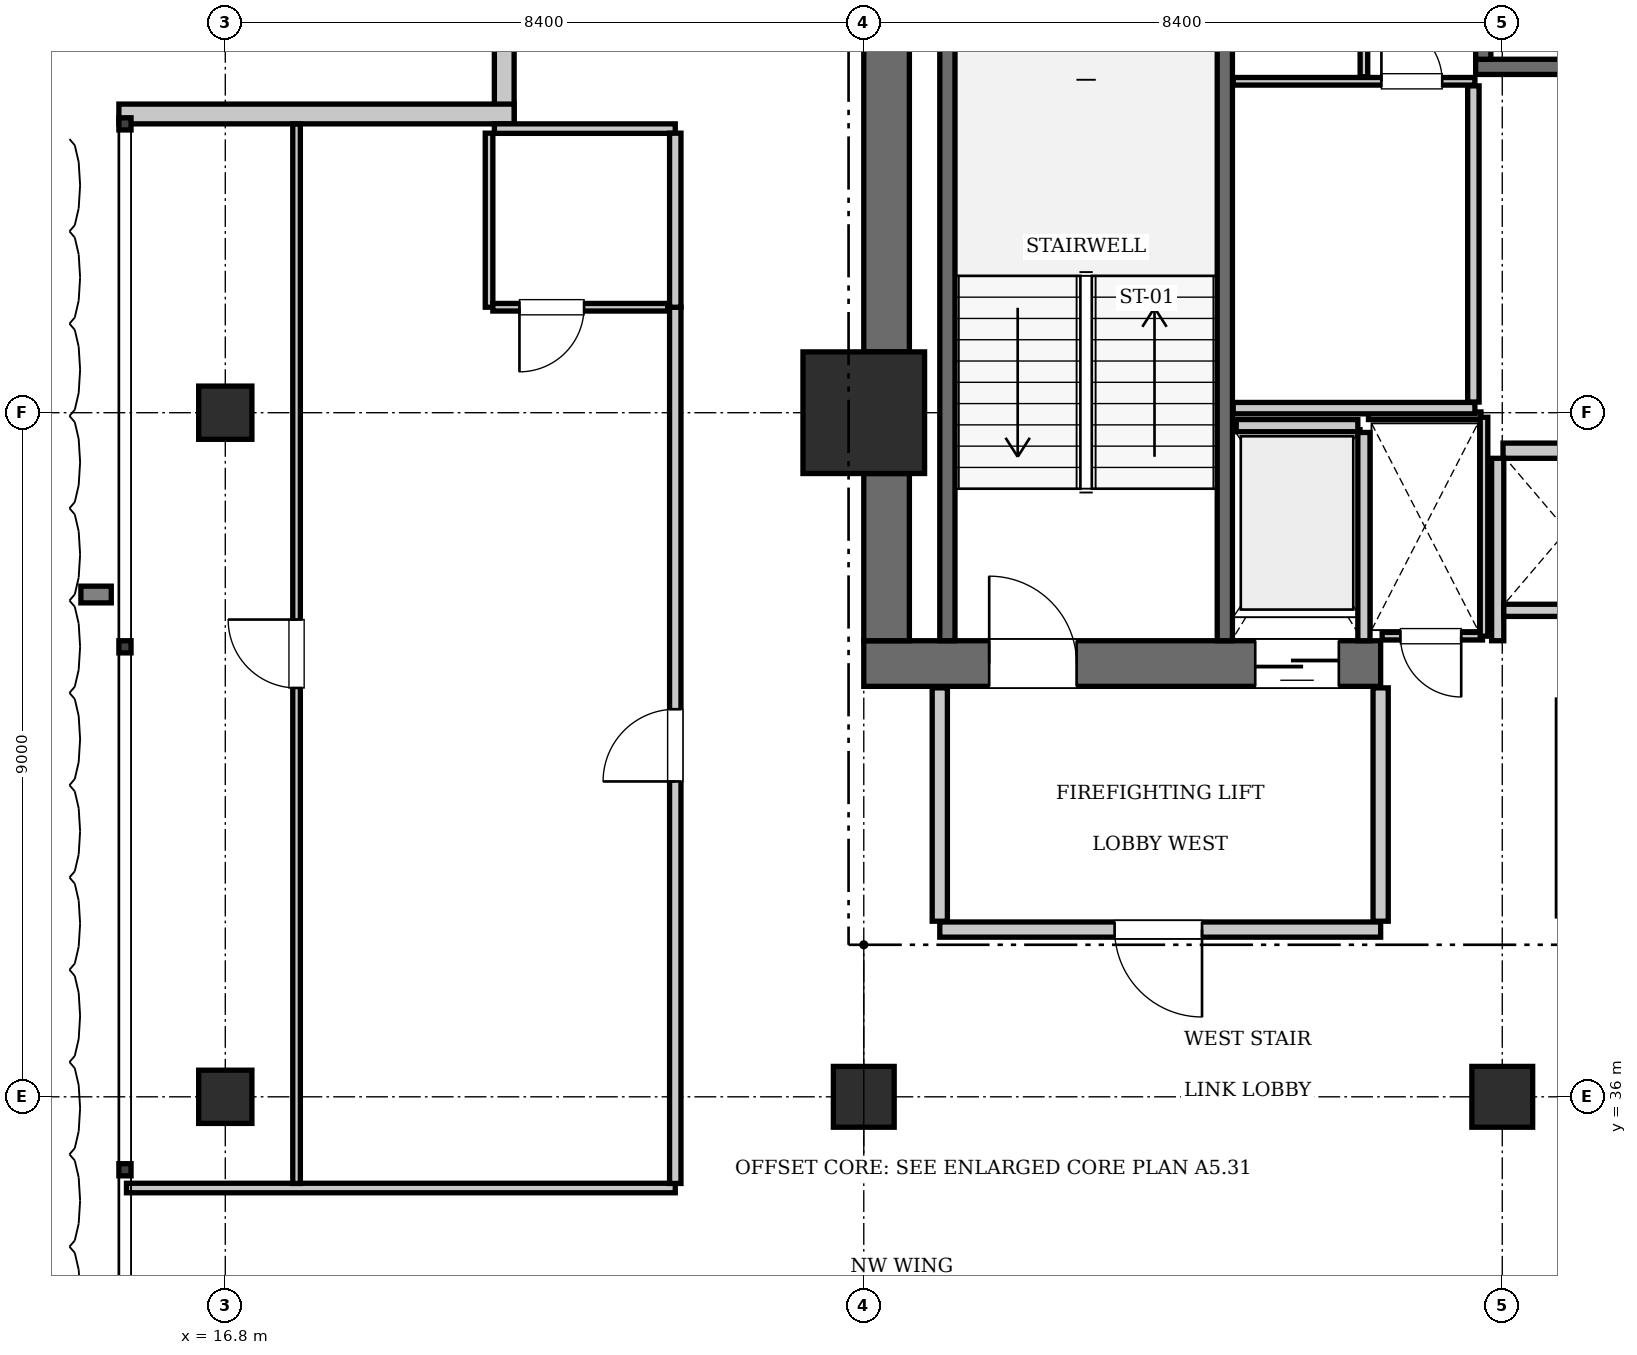
"""IFC4 building model, lengths in metres.
Left out: names, types, materials, properties, quantities, classifications, styles, units other than length and angle.
Written with IfcOpenShell. Run it as: python <this file> out.ifc"""

import sys

from ifc_helpers import new_model, si_unit, direction, frame, frame_2d, origin, origin_2d, place, context, subcontext, project, spatial, rectangle, extrude, element, fill, save


model = new_model("IFC4")
c1 = context("Model", 3, precision=1e-05, world=origin(), true_north=direction((0.0, 1.0)))
c2 = subcontext(c1, "Body", "Model", "MODEL_VIEW")
j1 = project(units=[si_unit("LENGTHUNIT", "METRE"), si_unit("PLANEANGLEUNIT", "RADIAN")], contexts=[c1])
p1 = place(None, origin())
s1 = spatial("IfcSite", under=j1, at=p1, CompositionType="ELEMENT")
p2 = place(p1, origin())
s2 = spatial("IfcBuilding", under=s1, at=p2, CompositionType="ELEMENT")
p3 = place(p2, frame((0.0, 0.0, 277.9)))
s3 = spatial("IfcBuildingStorey", under=s2, at=p3, CompositionType="ELEMENT", Elevation=277.9)
p4 = place(p3, frame((25.2, 45.0, 0.0), z_axis=(0.0, 0.0, 1.0), x_axis=(1.0, 0.0, 0.0)))
e1 = element("IfcColumn", 1, at=p4, inside=s3, PredefinedType="COLUMN", context=c2, shape_type="SweptSolid", body=[
    extrude(rectangle(XDim=1.6, YDim=1.6, at=origin_2d()), origin(), (0.0, 0.0, 1.0), 3.85),
])
p5 = place(p3, frame((25.2, 41.7, 0.0), z_axis=(0.0, 0.0, 1.0), x_axis=(1.0, 0.0, 0.0)))
e2 = element("IfcWall", 2, at=p5, inside=s3, PredefinedType="SHEAR", context=c2, shape_type="SweptSolid", body=[
    extrude(rectangle(XDim=6.8, YDim=0.6, at=frame_2d((3.4, 0.0))), origin(), (0.0, 0.0, 1.0), 3.85),
])
p6 = place(p5, frame((1.65, 0.0, 0.0)))
e3 = element("IfcOpeningElement", 3, at=p6, cuts=e2, PredefinedType="OPENING", context=c2, shape_type="SweptSolid", body=[
    extrude(rectangle(XDim=1.15, YDim=2.15, at=frame_2d((0.575, 1.075))), frame((0.0, 0.31, 0.0), z_axis=(0.0, -1.0, 0.0), x_axis=(1.0, 0.0, 0.0)), (0.0, 0.0, 1.0), 0.62),
])
p7 = place(p5, frame((5.15, 0.0, 0.0)))
e4 = element("IfcOpeningElement", 4, at=p7, cuts=e2, PredefinedType="OPENING", context=c2, shape_type="SweptSolid", body=[
    extrude(rectangle(XDim=1.1, YDim=2.2, at=frame_2d((0.55, 1.1))), frame((0.0, 0.31, 0.0), z_axis=(0.0, -1.0, 0.0), x_axis=(1.0, 0.0, 0.0)), (0.0, 0.0, 1.0), 0.62),
])
p8 = place(p3, frame((25.5, 42.0, 0.0), z_axis=(0.0, 0.0, 1.0), x_axis=(0.0, 1.0, 0.0)))
e5 = element("IfcWall", 5, at=p8, inside=s3, PredefinedType="SHEAR", context=c2, shape_type="SweptSolid", body=[
    extrude(rectangle(XDim=2.2, YDim=0.6, at=frame_2d((1.1, 0.0))), origin(), (0.0, 0.0, 1.0), 3.85),
])
p9 = place(p3, frame((25.5, 45.8, 0.0), z_axis=(0.0, 0.0, 1.0), x_axis=(0.0, 1.0, 0.0)))
e6 = element("IfcWall", 6, at=p9, inside=s3, PredefinedType="SHEAR", context=c2, shape_type="SweptSolid", body=[
    extrude(rectangle(XDim=7.6, YDim=0.6, at=frame_2d((3.8, 0.0))), origin(), (0.0, 0.0, 1.0), 3.85),
])
for number, where, z_axis, x_axis in (
    (7, (25.2, 36.0, 0.0), (0.0, 0.0, 1.0), (1.0, 0.0, 0.0)),
    (8, (33.6, 36.0, 0.0), (0.0, 0.0, 1.0), (1.0, 0.0, 0.0)),
):
    element("IfcColumn", number, at=place(p3, frame(where, z_axis=z_axis, x_axis=x_axis)), inside=s3, PredefinedType="COLUMN", context=c2, shape_type="SweptSolid", body=[
        extrude(rectangle(XDim=0.8, YDim=0.8, at=origin_2d()), origin(), (0.0, 0.0, 1.0), 3.85),
    ])
for number, where, z_axis, x_axis in (
    (9, (16.8, 36.0, 0.0), (0.0, 0.0, 1.0), (1.0, 0.0, 0.0)),
    (10, (16.8, 45.0, 0.0), (0.0, 0.0, 1.0), (1.0, 0.0, 0.0)),
):
    element("IfcColumn", number, at=place(p3, frame(where, z_axis=z_axis, x_axis=x_axis)), inside=s3, PredefinedType="COLUMN", context=c2, shape_type="SweptSolid", body=[
        extrude(rectangle(XDim=0.7, YDim=0.7, at=origin_2d()), origin(), (0.0, 0.0, 1.0), 3.85),
    ])
p10 = place(p3, frame((29.95, 42.0, 0.0), z_axis=(0.0, 0.0, 1.0), x_axis=(0.0, 1.0, 0.0)))
e11 = element("IfcWall", 11, at=p10, inside=s3, PredefinedType="SOLIDWALL", context=c2, shape_type="SweptSolid", body=[
    extrude(rectangle(XDim=9.15, YDim=0.2, at=frame_2d((4.575, 0.0))), origin(), (0.0, 0.0, 1.0), 3.61),
])
p11 = place(p3, frame((26.3, 42.0, 0.0), z_axis=(0.0, 0.0, 1.0), x_axis=(0.0, 1.0, 0.0)))
e12 = element("IfcWall", 12, at=p11, inside=s3, PredefinedType="SOLIDWALL", context=c2, shape_type="SweptSolid", body=[
    extrude(rectangle(XDim=9.12, YDim=0.2, at=frame_2d((4.56, 0.0))), origin(), (0.0, 0.0, 1.0), 3.61),
])
p12 = place(p3, frame((33.25, 49.55, 0.0), z_axis=(0.0, 0.0, 1.0), x_axis=(1.0, 0.0, 0.0)))
e13 = element("IfcWall", 13, at=p12, inside=s3, PredefinedType="SOLIDWALL", context=c2, shape_type="SweptSolid", body=[
    extrude(rectangle(XDim=9.1, YDim=0.2, at=frame_2d((4.55, 0.0))), origin(), (0.0, 0.0, 1.0), 3.61),
])
p13 = place(p3, frame((33.35, 49.65, 0.0), z_axis=(0.0, 0.0, 1.0), x_axis=(0.0, 1.0, 0.0)))
e14 = element("IfcWall", 14, at=p13, inside=s3, PredefinedType="SOLIDWALL", context=c2, shape_type="SweptSolid", body=[
    extrude(rectangle(XDim=3.75, YDim=0.2, at=frame_2d((1.875, 0.0))), origin(), (0.0, 0.0, 1.0), 3.61),
])
p14 = place(p13, frame((0.18, 0.0, 0.0)))
e15 = element("IfcOpeningElement", 15, at=p14, cuts=e14, PredefinedType="OPENING", context=c2, shape_type="SweptSolid", body=[
    extrude(rectangle(XDim=1.1, YDim=2.15, at=frame_2d((0.55, 1.075))), frame((0.0, 0.11, 0.0), z_axis=(0.0, -1.0, 0.0), x_axis=(1.0, 0.0, 0.0)), (0.0, 0.0, 1.0), 0.22),
])
p15 = place(p3, frame((33.61, 44.5, 0.0), z_axis=(0.0, 0.0, 1.0), x_axis=(1.0, 0.0, 0.0)))
e16 = element("IfcWall", 16, at=p15, inside=s3, PredefinedType="SOLIDWALL", context=c2, shape_type="SweptSolid", body=[
    extrude(rectangle(XDim=1.68, YDim=0.2, at=frame_2d((0.84, 0.0))), origin(), (0.0, 0.0, 1.0), 3.61),
])
p16 = place(p3, frame((30.1, 44.83, 0.0), z_axis=(0.0, 0.0, 1.0), x_axis=(1.0, 0.0, 0.0)))
e17 = element("IfcWall", 17, at=p16, inside=s3, PredefinedType="SOLIDWALL", context=c2, shape_type="SweptSolid", body=[
    extrude(rectangle(XDim=1.6, YDim=0.16, at=frame_2d((0.8, 0.0))), origin(), (0.0, 0.0, 1.0), 3.61),
])
p17 = place(p3, frame((31.78, 42.0, 0.0), z_axis=(0.0, 0.0, 1.0), x_axis=(0.0, 1.0, 0.0)))
e18 = element("IfcWall", 18, at=p17, inside=s3, PredefinedType="SOLIDWALL", context=c2, shape_type="SweptSolid", body=[
    extrude(rectangle(XDim=2.74, YDim=0.16, at=frame_2d((1.37, 0.0))), origin(), (0.0, 0.0, 1.0), 3.61),
])
p18 = place(p3, frame((33.54, 42.0, 0.0), z_axis=(0.0, 0.0, 1.0), x_axis=(0.0, 1.0, 0.0)))
e19 = element("IfcWall", 19, at=p18, inside=s3, PredefinedType="SOLIDWALL", context=c2, shape_type="SweptSolid", body=[
    extrude(rectangle(XDim=2.4, YDim=0.16, at=frame_2d((1.2, 0.0))), origin(), (0.0, 0.0, 1.0), 3.61),
])
p19 = place(p3, frame((33.62, 42.4, 0.0), z_axis=(0.0, 0.0, 1.0), x_axis=(1.0, 0.0, 0.0)))
e20 = element("IfcWall", 20, at=p19, inside=s3, PredefinedType="SOLIDWALL", context=c2, shape_type="SweptSolid", body=[
    extrude(rectangle(XDim=1.66, YDim=0.16, at=frame_2d((0.83, 0.0))), origin(), (0.0, 0.0, 1.0), 3.61),
])
p20 = place(p3, frame((20.47, 48.8, 0.0), z_axis=(0.0, 0.0, 1.0), x_axis=(0.0, 1.0, 0.0)))
e21 = element("IfcWall", 21, at=p20, inside=s3, PredefinedType="SOLIDWALL", context=c2, shape_type="SweptSolid", body=[
    extrude(rectangle(XDim=5.2, YDim=0.26, at=frame_2d((2.6, 0.0))), origin(), (0.0, 0.0, 1.0), 3.61),
])
p21 = place(p3, frame((15.4, 48.93, 0.0), z_axis=(0.0, 0.0, 1.0), x_axis=(1.0, 0.0, 0.0)))
e22 = element("IfcWall", 22, at=p21, inside=s3, PredefinedType="SOLIDWALL", context=c2, shape_type="SweptSolid", body=[
    extrude(rectangle(XDim=5.2, YDim=0.26, at=frame_2d((2.6, 0.0))), origin(), (0.0, 0.0, 1.0), 3.61),
])
p22 = place(p3, frame((26.2, 38.2, 0.0), z_axis=(0.0, 0.0, 1.0), x_axis=(1.0, 0.0, 0.0)))
e23 = element("IfcWall", 23, at=p22, inside=s3, PredefinedType="PARTITIONING", context=c2, shape_type="SweptSolid", body=[
    extrude(rectangle(XDim=5.8, YDim=0.2, at=frame_2d((2.9, 0.0))), origin(), (0.0, 0.0, 1.0), 3.61),
])
p23 = place(p22, frame((2.3, 0.0, 0.0)))
e24 = element("IfcOpeningElement", 24, at=p23, cuts=e23, PredefinedType="OPENING", context=c2, shape_type="SweptSolid", body=[
    extrude(rectangle(XDim=1.15, YDim=2.15, at=frame_2d((0.575, 1.075))), frame((0.0, 0.11, 0.0), z_axis=(0.0, -1.0, 0.0), x_axis=(1.0, 0.0, 0.0)), (0.0, 0.0, 1.0), 0.22),
])
for number, where, z_axis, x_axis in (
    (25, (26.2, 38.31, 0.0), (0.0, 0.0, 1.0), (0.0, 1.0, 0.0)),
    (26, (32.0, 38.31, 0.0), (0.0, 0.0, 1.0), (0.0, 1.0, 0.0)),
):
    element("IfcWall", number, at=place(p3, frame(where, z_axis=z_axis, x_axis=x_axis)), inside=s3, PredefinedType="PARTITIONING", context=c2, shape_type="SweptSolid", body=[
        extrude(rectangle(XDim=3.07, YDim=0.2, at=frame_2d((1.535, 0.0))), origin(), (0.0, 0.0, 1.0), 3.61),
    ])
p24 = place(p3, frame((32.02, 42.06, 0.0), z_axis=(0.0, 0.0, 1.0), x_axis=(1.0, 0.0, 0.0)))
e27 = element("IfcWall", 27, at=p24, inside=s3, PredefinedType="PARTITIONING", context=c2, shape_type="SweptSolid", body=[
    extrude(rectangle(XDim=1.32, YDim=0.1, at=frame_2d((0.66, 0.0))), origin(), (0.0, 0.0, 1.0), 3.61),
])
p25 = place(p24, frame((0.24, 0.0, 0.0)))
e28 = element("IfcOpeningElement", 28, at=p25, cuts=e27, PredefinedType="OPENING", context=c2, shape_type="SweptSolid", body=[
    extrude(rectangle(XDim=0.8, YDim=2.05, at=frame_2d((0.4, 1.025))), frame((0.0, 0.06, 0.0), z_axis=(0.0, -1.0, 0.0), x_axis=(1.0, 0.0, 0.0)), (0.0, 0.0, 1.0), 0.12),
])
p26 = place(p3, frame((31.84, 44.96, 0.0), z_axis=(0.0, 0.0, 1.0), x_axis=(1.0, 0.0, 0.0)))
e29 = element("IfcWall", 29, at=p26, inside=s3, PredefinedType="PARTITIONING", context=c2, shape_type="SweptSolid", body=[
    extrude(rectangle(XDim=1.48, YDim=0.1, at=frame_2d((0.74, 0.0))), origin(), (0.0, 0.0, 1.0), 3.61),
])
p27 = place(p3, frame((33.36, 42.06, 0.0), z_axis=(0.0, 0.0, 1.0), x_axis=(0.0, 1.0, 0.0)))
e30 = element("IfcWall", 30, at=p27, inside=s3, PredefinedType="PARTITIONING", context=c2, shape_type="SweptSolid", body=[
    extrude(rectangle(XDim=2.88, YDim=0.1, at=frame_2d((1.44, 0.0))), origin(), (0.0, 0.0, 1.0), 3.61),
])
p28 = place(p3, frame((30.06, 45.06, 0.0), z_axis=(0.0, 0.0, 1.0), x_axis=(1.0, 0.0, 0.0)))
e31 = element("IfcWall", 31, at=p28, inside=s3, PredefinedType="PARTITIONING", context=c2, shape_type="SweptSolid", body=[
    extrude(rectangle(XDim=3.18, YDim=0.15, at=frame_2d((1.59, 0.0))), origin(), (0.0, 0.0, 1.0), 3.61),
])
p29 = place(p3, frame((33.22, 45.14, 0.0), z_axis=(0.0, 0.0, 1.0), x_axis=(0.0, 1.0, 0.0)))
e32 = element("IfcWall", 32, at=p29, inside=s3, PredefinedType="PARTITIONING", context=c2, shape_type="SweptSolid", body=[
    extrude(rectangle(XDim=4.16, YDim=0.15, at=frame_2d((2.08, 0.0))), origin(), (0.0, 0.0, 1.0), 3.61),
])
p30 = place(p3, frame((30.06, 49.36, 0.0), z_axis=(0.0, 0.0, 1.0), x_axis=(1.0, 0.0, 0.0)))
e33 = element("IfcWall", 33, at=p30, inside=s3, PredefinedType="PARTITIONING", context=c2, shape_type="SweptSolid", body=[
    extrude(rectangle(XDim=3.18, YDim=0.1, at=frame_2d((1.59, 0.0))), origin(), (0.0, 0.0, 1.0), 3.61),
])
p31 = place(p30, frame((1.95, 0.0, 0.0)))
e34 = element("IfcOpeningElement", 34, at=p31, cuts=e33, PredefinedType="OPENING", context=c2, shape_type="SweptSolid", body=[
    extrude(rectangle(XDim=0.8, YDim=2.05, at=frame_2d((0.4, 1.025))), frame((0.0, 0.06, 0.0), z_axis=(0.0, -1.0, 0.0), x_axis=(1.0, 0.0, 0.0)), (0.0, 0.0, 1.0), 0.12),
])
p32 = place(p3, frame((31.78, 49.42, 0.0), z_axis=(0.0, 0.0, 1.0), x_axis=(0.0, 1.0, 0.0)))
e35 = element("IfcWall", 35, at=p32, inside=s3, PredefinedType="PARTITIONING", context=c2, shape_type="SweptSolid", body=[
    extrude(rectangle(XDim=1.68, YDim=0.1, at=frame_2d((0.84, 0.0))), origin(), (0.0, 0.0, 1.0), 3.61),
])
p33 = place(p32, frame((0.35, 0.0, 0.0)))
e36 = element("IfcOpeningElement", 36, at=p33, cuts=e35, PredefinedType="OPENING", context=c2, shape_type="SweptSolid", body=[
    extrude(rectangle(XDim=0.8, YDim=2.05, at=frame_2d((0.4, 1.025))), frame((0.0, 0.06, 0.0), z_axis=(0.0, -1.0, 0.0), x_axis=(1.0, 0.0, 0.0)), (0.0, 0.0, 1.0), 0.12),
])
p34 = place(p3, frame((15.5, 34.8, 0.0), z_axis=(0.0, 0.0, 1.0), x_axis=(1.0, 0.0, 0.0)))
e37 = element("IfcWall", 37, at=p34, inside=s3, PredefinedType="PARTITIONING", context=c2, shape_type="SweptSolid", body=[
    extrude(rectangle(XDim=7.22, YDim=0.125, at=frame_2d((3.61, 0.0))), origin(), (0.0, 0.0, 1.0), 3.61),
])
p35 = place(p3, frame((20.34, 48.738, 0.0), z_axis=(0.0, 0.0, 1.0), x_axis=(1.0, 0.0, 0.0)))
e38 = element("IfcWall", 38, at=p35, inside=s3, PredefinedType="PARTITIONING", context=c2, shape_type="SweptSolid", body=[
    extrude(rectangle(XDim=2.38, YDim=0.125, at=frame_2d((1.19, 0.0))), origin(), (0.0, 0.0, 1.0), 3.61),
])
p36 = place(p3, frame((22.72, 34.86, 0.0), z_axis=(0.0, 0.0, 1.0), x_axis=(0.0, 1.0, 0.0)))
e39 = element("IfcWall", 39, at=p36, inside=s3, PredefinedType="PARTITIONING", context=c2, shape_type="SweptSolid", body=[
    extrude(rectangle(XDim=11.527, YDim=0.15, at=frame_2d((5.764, 0.0))), origin(), (0.0, 0.0, 1.0), 3.61),
])
p37 = place(p36, frame((5.289, 0.0, 0.0)))
e40 = element("IfcOpeningElement", 40, at=p37, cuts=e39, PredefinedType="OPENING", context=c2, shape_type="SweptSolid", body=[
    extrude(rectangle(XDim=0.95, YDim=2.15, at=frame_2d((0.475, 1.075))), frame((0.0, 0.085, 0.0), z_axis=(0.0, -1.0, 0.0), x_axis=(1.0, 0.0, 0.0)), (0.0, 0.0, 1.0), 0.17),
])
p38 = place(p3, frame((22.72, 46.387, 0.0), z_axis=(0.0, 0.0, 1.0), x_axis=(0.0, 1.0, 0.0)))
e41 = element("IfcWall", 41, at=p38, inside=s3, PredefinedType="PARTITIONING", context=c2, shape_type="SweptSolid", body=[
    extrude(rectangle(XDim=2.29, YDim=0.15, at=frame_2d((1.145, 0.0))), origin(), (0.0, 0.0, 1.0), 3.61),
])
p39 = place(p3, frame((20.27, 46.387, 0.0), z_axis=(0.0, 0.0, 1.0), x_axis=(0.0, 1.0, 0.0)))
e42 = element("IfcWall", 42, at=p39, inside=s3, PredefinedType="PARTITIONING", context=c2, shape_type="SweptSolid", body=[
    extrude(rectangle(XDim=2.29, YDim=0.1, at=frame_2d((1.145, 0.0))), origin(), (0.0, 0.0, 1.0), 3.61),
])
p40 = place(p3, frame((20.32, 46.387, 0.0), z_axis=(0.0, 0.0, 1.0), x_axis=(1.0, 0.0, 0.0)))
e43 = element("IfcWall", 43, at=p40, inside=s3, PredefinedType="PARTITIONING", context=c2, shape_type="SweptSolid", body=[
    extrude(rectangle(XDim=2.3, YDim=0.1, at=frame_2d((1.15, 0.0))), origin(), (0.0, 0.0, 1.0), 3.61),
])
p41 = place(p40, frame((0.35, 0.0, 0.0)))
e44 = element("IfcOpeningElement", 44, at=p41, cuts=e43, PredefinedType="OPENING", context=c2, shape_type="SweptSolid", body=[
    extrude(rectangle(XDim=0.85, YDim=2.1, at=frame_2d((0.425, 1.05))), frame((0.0, 0.06, 0.0), z_axis=(0.0, -1.0, 0.0), x_axis=(1.0, 0.0, 0.0)), (0.0, 0.0, 1.0), 0.12),
])
p42 = place(p3, frame((17.738, 34.86, 0.0), z_axis=(0.0, 0.0, 1.0), x_axis=(0.0, 1.0, 0.0)))
e45 = element("IfcWall", 45, at=p42, inside=s3, PredefinedType="PARTITIONING", context=c2, shape_type="SweptSolid", body=[
    extrude(rectangle(XDim=13.938, YDim=0.1, at=frame_2d((6.969, 0.0))), origin(), (0.0, 0.0, 1.0), 3.61),
])
p43 = place(p42, frame((6.519, 0.0, 0.0)))
e46 = element("IfcOpeningElement", 46, at=p43, cuts=e45, PredefinedType="OPENING", context=c2, shape_type="SweptSolid", body=[
    extrude(rectangle(XDim=0.9, YDim=2.1, at=frame_2d((0.45, 1.05))), frame((0.0, 0.06, 0.0), z_axis=(0.0, -1.0, 0.0), x_axis=(1.0, 0.0, 0.0)), (0.0, 0.0, 1.0), 0.12),
])
p44 = place(p6, origin())
e47 = element("IfcDoor", 47, at=p44, inside=s3, OperationType="SINGLE_SWING_LEFT", PredefinedType="DOOR", context=c2, shape_type="SweptSolid", body=[
    extrude(rectangle(XDim=1.15, YDim=2.15, at=frame_2d((0.575, 1.075))), frame((0.0, 0.025, 0.0), z_axis=(0.0, -1.0, 0.0), x_axis=(1.0, 0.0, 0.0)), (0.0, 0.0, 1.0), 0.05),
])
fill(e3, e47)
p45 = place(p7, frame((1.1, 0.0, 0.0), z_axis=(0.0, 0.0, 1.0), x_axis=(-1.0, 0.0, 0.0)))
e48 = element("IfcDoor", 48, at=p45, inside=s3, OperationType="SLIDING_TO_LEFT", PredefinedType="DOOR", context=c2, shape_type="SweptSolid", body=[
    extrude(rectangle(XDim=1.1, YDim=2.2, at=frame_2d((0.55, 1.1))), frame((0.0, 0.025, 0.0), z_axis=(0.0, -1.0, 0.0), x_axis=(1.0, 0.0, 0.0)), (0.0, 0.0, 1.0), 0.05),
])
fill(e4, e48)
p46 = place(p23, frame((1.15, 0.0, 0.0), z_axis=(0.0, 0.0, 1.0), x_axis=(-1.0, 0.0, 0.0)))
e49 = element("IfcDoor", 49, at=p46, inside=s3, OperationType="SINGLE_SWING_LEFT", PredefinedType="DOOR", context=c2, shape_type="SweptSolid", body=[
    extrude(rectangle(XDim=1.15, YDim=2.15, at=frame_2d((0.575, 1.075))), frame((0.0, 0.025, 0.0), z_axis=(0.0, -1.0, 0.0), x_axis=(1.0, 0.0, 0.0)), (0.0, 0.0, 1.0), 0.05),
])
fill(e24, e49)
p47 = place(p25, frame((0.8, 0.0, 0.0), z_axis=(0.0, 0.0, 1.0), x_axis=(-1.0, 0.0, 0.0)))
e50 = element("IfcDoor", 50, at=p47, inside=s3, OperationType="SINGLE_SWING_LEFT", PredefinedType="DOOR", context=c2, shape_type="SweptSolid", body=[
    extrude(rectangle(XDim=0.8, YDim=2.05, at=frame_2d((0.4, 1.025))), frame((0.0, 0.025, 0.0), z_axis=(0.0, -1.0, 0.0), x_axis=(1.0, 0.0, 0.0)), (0.0, 0.0, 1.0), 0.05),
])
fill(e28, e50)
p48 = place(p31, origin())
e51 = element("IfcDoor", 51, at=p48, inside=s3, OperationType="SINGLE_SWING_LEFT", PredefinedType="DOOR", context=c2, shape_type="SweptSolid", body=[
    extrude(rectangle(XDim=0.8, YDim=2.05, at=frame_2d((0.4, 1.025))), frame((0.0, 0.025, 0.0), z_axis=(0.0, -1.0, 0.0), x_axis=(1.0, 0.0, 0.0)), (0.0, 0.0, 1.0), 0.05),
])
fill(e34, e51)
p49 = place(p41, frame((0.85, 0.0, 0.0), z_axis=(0.0, 0.0, 1.0), x_axis=(-1.0, 0.0, 0.0)))
e52 = element("IfcDoor", 52, at=p49, inside=s3, OperationType="SINGLE_SWING_RIGHT", PredefinedType="DOOR", context=c2, shape_type="SweptSolid", body=[
    extrude(rectangle(XDim=0.85, YDim=2.1, at=frame_2d((0.425, 1.05))), frame((0.0, 0.025, 0.0), z_axis=(0.0, -1.0, 0.0), x_axis=(1.0, 0.0, 0.0)), (0.0, 0.0, 1.0), 0.05),
])
fill(e44, e52)
p50 = place(p37, origin())
e53 = element("IfcDoor", 53, at=p50, inside=s3, OperationType="SINGLE_SWING_LEFT", PredefinedType="DOOR", context=c2, shape_type="SweptSolid", body=[
    extrude(rectangle(XDim=0.95, YDim=2.15, at=frame_2d((0.475, 1.075))), frame((0.0, 0.025, 0.0), z_axis=(0.0, -1.0, 0.0), x_axis=(1.0, 0.0, 0.0)), (0.0, 0.0, 1.0), 0.05),
])
fill(e40, e53)
p51 = place(p43, origin())
e54 = element("IfcDoor", 54, at=p51, inside=s3, OperationType="SINGLE_SWING_RIGHT", PredefinedType="DOOR", context=c2, shape_type="SweptSolid", body=[
    extrude(rectangle(XDim=0.9, YDim=2.1, at=frame_2d((0.45, 1.05))), frame((0.0, 0.025, 0.0), z_axis=(0.0, -1.0, 0.0), x_axis=(1.0, 0.0, 0.0)), (0.0, 0.0, 1.0), 0.05),
])
fill(e46, e54)
save(model, sys.argv[1])
